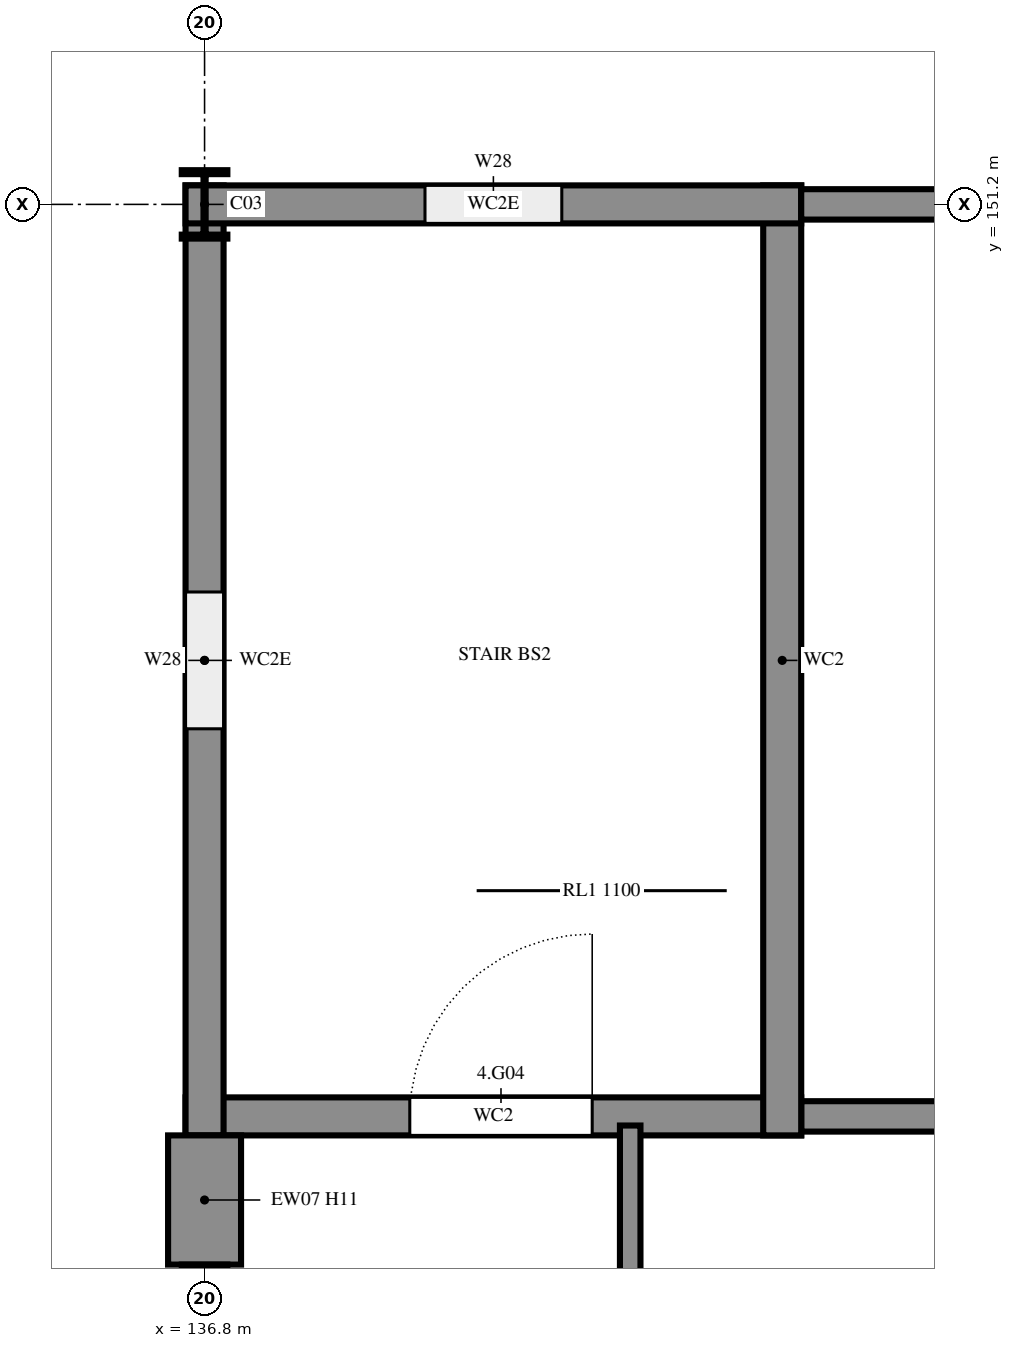
"""IFC4 building model, lengths in metres.
Left out: names, types, materials, properties, quantities, classifications, styles, units other than length and angle.
Written with IfcOpenShell. Run it as: python <this file> out.ifc"""

import sys

from ifc_helpers import new_model, si_unit, direction, frame, frame_2d, origin, origin_2d, place, context, subcontext, project, spatial, rectangle, i_section, extrude, element, fill, save


model = new_model("IFC4")
c1 = context("Model", 3, precision=1e-05, world=origin(), true_north=direction((0.0, 1.0)))
c2 = subcontext(c1, "Body", "Model", "MODEL_VIEW")
j1 = project(units=[si_unit("LENGTHUNIT", "METRE"), si_unit("PLANEANGLEUNIT", "RADIAN")], contexts=[c1])
p1 = place(None, origin())
s1 = spatial("IfcSite", under=j1, at=p1, CompositionType="ELEMENT")
p2 = place(p1, origin())
s2 = spatial("IfcBuilding", under=s1, at=p2, CompositionType="ELEMENT")
p3 = place(p2, frame((0.0, 0.0, 14.4)))
s3 = spatial("IfcBuildingStorey", under=s2, at=p3, CompositionType="ELEMENT", Elevation=14.4)
for number, where, z_axis, x_axis in (
    (1, (136.8, 151.2, 0.0), (0.0, 0.0, 1.0), (1.0, 0.0, 0.0)),
    (2, (136.8, 144.0, 0.0), (0.0, 0.0, 1.0), (1.0, 0.0, 0.0)),
):
    element("IfcColumn", number, at=place(p3, frame(where, z_axis=z_axis, x_axis=x_axis)), inside=s3, PredefinedType="COLUMN", context=c2, shape_type="SweptSolid", body=[
        extrude(i_section(OverallWidth=0.3, OverallDepth=0.45, WebThickness=0.014, FlangeThickness=0.026, FilletRadius=0.027, at=origin_2d()), origin(), (0.0, 0.0, 1.0), 3.6),
    ])
p4 = place(p3, frame((136.675, 145.2, 0.0), z_axis=(0.0, 0.0, 1.0), x_axis=(1.0, 0.0, 0.0)))
e3 = element("IfcWall", 3, at=p4, inside=s3, PredefinedType="SHEAR", context=c2, shape_type="SweptSolid", body=[
    extrude(rectangle(XDim=4.05, YDim=0.25, at=frame_2d((2.025, 0.0))), origin(), (0.0, 0.0, 1.0), 3.6),
])
p5 = place(p4, frame((1.475, 0.0, 0.0)))
e4 = element("IfcOpeningElement", 4, at=p5, cuts=e3, PredefinedType="OPENING", context=c2, shape_type="SweptSolid", body=[
    extrude(rectangle(XDim=1.2, YDim=2.4, at=frame_2d((0.6, 1.2))), frame((0.0, 0.135, 0.0), z_axis=(0.0, -1.0, 0.0), x_axis=(1.0, 0.0, 0.0)), (0.0, 0.0, 1.0), 0.27),
])
p6 = place(p3, frame((140.725, 145.2, 0.0), z_axis=(0.0, 0.0, 1.0), x_axis=(1.0, 0.0, 0.0)))
e5 = element("IfcWall", 5, at=p6, inside=s3, PredefinedType="SHEAR", context=c2, shape_type="SweptSolid", body=[
    extrude(rectangle(XDim=2.375, YDim=0.2, at=frame_2d((1.188, 0.0))), origin(), (0.0, 0.0, 1.0), 3.6),
])
p7 = place(p3, frame((140.6, 145.075, 0.0), z_axis=(0.0, 0.0, 1.0), x_axis=(0.0, 1.0, 0.0)))
e6 = element("IfcWall", 6, at=p7, inside=s3, PredefinedType="SHEAR", context=c2, shape_type="SweptSolid", body=[
    extrude(rectangle(XDim=6.25, YDim=0.25, at=frame_2d((3.125, 0.0))), origin(), (0.0, 0.0, 1.0), 3.6),
])
p8 = place(p3, frame((136.8, 151.325, 0.0), z_axis=(0.0, 0.0, 1.0), x_axis=(0.0, -1.0, 0.0)))
e7 = element("IfcWall", 7, at=p8, inside=s3, PredefinedType="SHEAR", context=c2, shape_type="SweptSolid", body=[
    extrude(rectangle(XDim=6.25, YDim=0.25, at=frame_2d((3.125, 0.0))), origin(), (0.0, 0.0, 1.0), 3.6),
])
p9 = place(p8, frame((2.675, 0.0, 0.6)))
e8 = element("IfcOpeningElement", 8, at=p9, cuts=e7, PredefinedType="OPENING", context=c2, shape_type="SweptSolid", body=[
    extrude(rectangle(XDim=0.9, YDim=2.1, at=frame_2d((0.45, 1.05))), frame((0.0, 0.135, 0.0), z_axis=(0.0, -1.0, 0.0), x_axis=(1.0, 0.0, 0.0)), (0.0, 0.0, 1.0), 0.27),
])
p10 = place(p3, frame((140.725, 151.2, 0.0), z_axis=(0.0, 0.0, 1.0), x_axis=(-1.0, 0.0, 0.0)))
e9 = element("IfcWall", 9, at=p10, inside=s3, PredefinedType="SHEAR", context=c2, shape_type="SweptSolid", body=[
    extrude(rectangle(XDim=4.05, YDim=0.25, at=frame_2d((2.025, 0.0))), origin(), (0.0, 0.0, 1.0), 3.6),
])
p11 = place(p10, frame((1.575, 0.0, 0.6)))
e10 = element("IfcOpeningElement", 10, at=p11, cuts=e9, PredefinedType="OPENING", context=c2, shape_type="SweptSolid", body=[
    extrude(rectangle(XDim=0.9, YDim=2.1, at=frame_2d((0.45, 1.05))), frame((0.0, 0.135, 0.0), z_axis=(0.0, -1.0, 0.0), x_axis=(1.0, 0.0, 0.0)), (0.0, 0.0, 1.0), 0.27),
])
p12 = place(p3, frame((143.1, 151.2, 0.0), z_axis=(0.0, 0.0, 1.0), x_axis=(-1.0, 0.0, 0.0)))
e11 = element("IfcWall", 11, at=p12, inside=s3, PredefinedType="SHEAR", context=c2, shape_type="SweptSolid", body=[
    extrude(rectangle(XDim=2.375, YDim=0.2, at=frame_2d((1.188, 0.0))), origin(), (0.0, 0.0, 1.0), 3.6),
])
p13 = place(p3, frame((136.8, 145.075, 0.0), z_axis=(0.0, 0.0, 1.0), x_axis=(0.0, -1.0, 0.0)))
e12 = element("IfcWall", 12, at=p13, inside=s3, PredefinedType="SOLIDWALL", context=c2, shape_type="SweptSolid", body=[
    extrude(rectangle(XDim=0.85, YDim=0.48, at=frame_2d((0.425, 0.0))), origin(), (0.0, 0.0, 1.0), 3.22),
])
p14 = place(p3, frame((139.6, 145.14, 0.0), z_axis=(0.0, 0.0, 1.0), x_axis=(0.0, -1.0, 0.0)))
e13 = element("IfcWall", 13, at=p14, inside=s3, PredefinedType="PARTITIONING", context=c2, shape_type="SweptSolid", body=[
    extrude(rectangle(XDim=5.002, YDim=0.135, at=frame_2d((2.501, 0.0))), origin(), (0.0, 0.0, 1.0), 3.42),
])
p15 = place(p14, frame((1.75, 0.0, 0.0)))
e14 = element("IfcOpeningElement", 14, at=p15, cuts=e13, PredefinedType="OPENING", context=c2, shape_type="SweptSolid", body=[
    extrude(rectangle(XDim=1.5, YDim=2.1, at=frame_2d((0.75, 1.05))), frame((0.0, 0.077, 0.0), z_axis=(0.0, -1.0, 0.0), x_axis=(1.0, 0.0, 0.0)), (0.0, 0.0, 1.0), 0.155),
])
p16 = place(p11, origin())
e15 = element("IfcWindow", 15, at=p16, inside=s3, PartitioningType="SINGLE_PANEL", PredefinedType="WINDOW", context=c2, shape_type="SweptSolid", body=[
    extrude(rectangle(XDim=0.9, YDim=2.1, at=frame_2d((0.45, 1.05))), frame((0.0, 0.03, 0.0), z_axis=(0.0, -1.0, 0.0), x_axis=(1.0, 0.0, 0.0)), (0.0, 0.0, 1.0), 0.06),
])
fill(e10, e15)
p17 = place(p9, origin())
e16 = element("IfcWindow", 16, at=p17, inside=s3, PartitioningType="SINGLE_PANEL", PredefinedType="WINDOW", context=c2, shape_type="SweptSolid", body=[
    extrude(rectangle(XDim=0.9, YDim=2.1, at=frame_2d((0.45, 1.05))), frame((0.0, 0.03, 0.0), z_axis=(0.0, -1.0, 0.0), x_axis=(1.0, 0.0, 0.0)), (0.0, 0.0, 1.0), 0.06),
])
fill(e8, e16)
p18 = place(p5, origin())
e17 = element("IfcDoor", 17, at=p18, inside=s3, OperationType="SINGLE_SWING_LEFT", PredefinedType="DOOR", context=c2, shape_type="SweptSolid", body=[
    extrude(rectangle(XDim=1.2, YDim=2.4, at=frame_2d((0.6, 1.2))), frame((0.0, 0.025, 0.0), z_axis=(0.0, -1.0, 0.0), x_axis=(1.0, 0.0, 0.0)), (0.0, 0.0, 1.0), 0.05),
])
fill(e4, e17)
save(model, sys.argv[1])
